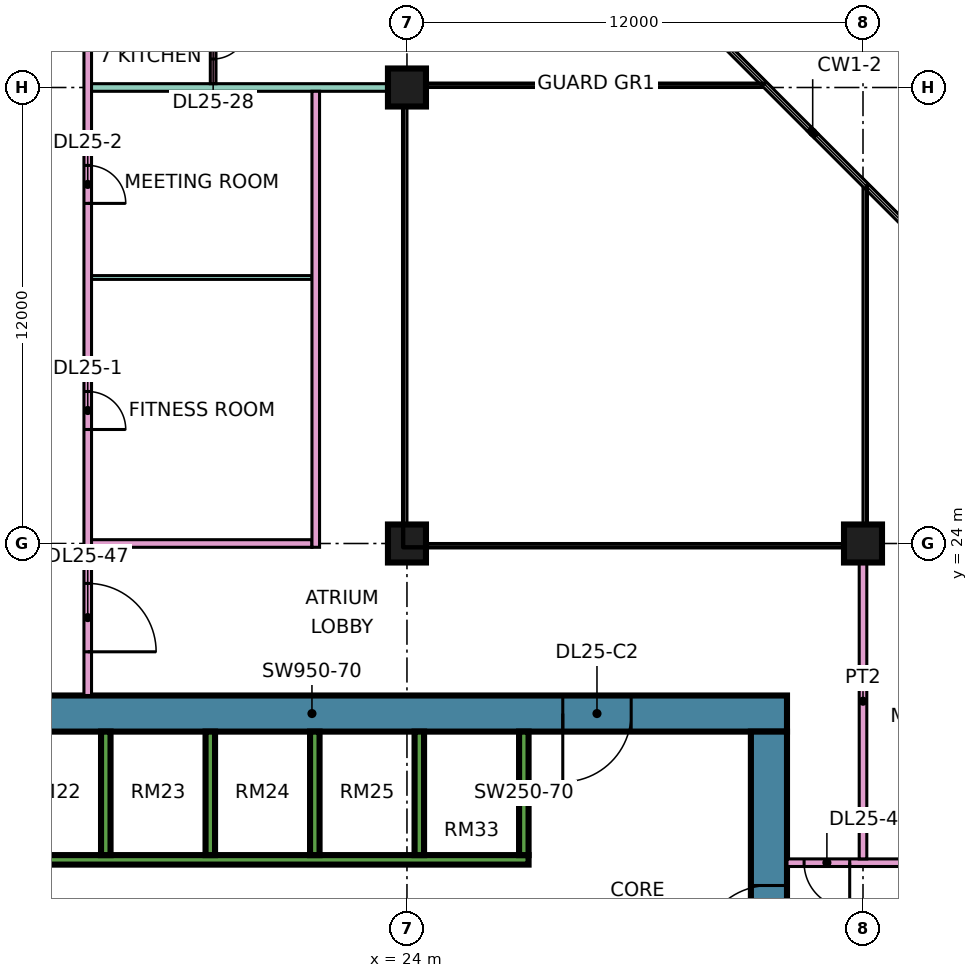
"""IFC4 building model, lengths in metres.
Left out: names, types, materials, properties, quantities, classifications, styles, units other than length and angle.
Written with IfcOpenShell. Run it as: python <this file> out.ifc"""

import sys

from ifc_helpers import new_model, si_unit, direction, frame, frame_2d, origin, origin_2d, place, context, subcontext, project, spatial, rectangle, extrude, element, fill, save


model = new_model("IFC4")
c1 = context("Model", 3, precision=1e-05, world=origin(), true_north=direction((0.0, 1.0)))
c2 = subcontext(c1, "Body", "Model", "MODEL_VIEW")
j1 = project(units=[si_unit("LENGTHUNIT", "METRE"), si_unit("PLANEANGLEUNIT", "RADIAN")], contexts=[c1])
p1 = place(None, origin())
s1 = spatial("IfcSite", under=j1, at=p1, CompositionType="ELEMENT")
p2 = place(p1, origin())
s2 = spatial("IfcBuilding", under=s1, at=p2, CompositionType="ELEMENT")
p3 = place(p2, frame((0.0, 0.0, 110.65)))
s3 = spatial("IfcBuildingStorey", under=s2, at=p3, CompositionType="ELEMENT", Elevation=110.65)
for number, where, z_axis, x_axis in (
    (1, (24.0, 24.0, 0.0), (0.0, 0.0, 1.0), (1.0, 0.0, 0.0)),
    (2, (24.0, 36.0, 0.0), (0.0, 0.0, 1.0), (1.0, 0.0, 0.0)),
    (3, (36.0, 24.0, 0.0), (0.0, 0.0, 1.0), (1.0, 0.0, 0.0)),
):
    element("IfcColumn", number, at=place(p3, frame(where, z_axis=z_axis, x_axis=x_axis)), inside=s3, PredefinedType="COLUMN", context=c2, shape_type="SweptSolid", body=[
        extrude(rectangle(XDim=1.0, YDim=1.0, at=origin_2d()), origin(), (0.0, 0.0, 1.0), 3.75),
    ])
p4 = place(p3, frame((9.0, 19.525, 0.0), z_axis=(0.0, 0.0, 1.0), x_axis=(1.0, 0.0, 0.0)))
e4 = element("IfcWall", 4, at=p4, inside=s3, PredefinedType="SHEAR", context=c2, shape_type="SweptSolid", body=[
    extrude(rectangle(XDim=25.0, YDim=0.95, at=frame_2d((12.5, 0.0))), origin(), (0.0, 0.0, 1.0), 3.75),
])
p5 = place(p4, frame((19.1, 0.0, 0.0)))
e5 = element("IfcOpeningElement", 5, at=p5, cuts=e4, PredefinedType="OPENING", context=c2, shape_type="SweptSolid", body=[
    extrude(rectangle(XDim=1.8, YDim=2.4, at=frame_2d((0.9, 1.2))), frame((0.0, 0.485, 0.0), z_axis=(0.0, -1.0, 0.0), x_axis=(1.0, 0.0, 0.0)), (0.0, 0.0, 1.0), 0.97),
])
p6 = place(p3, frame((33.525, 7.95, 0.0), z_axis=(0.0, 0.0, 1.0), x_axis=(0.0, 1.0, 0.0)))
e6 = element("IfcWall", 6, at=p6, inside=s3, PredefinedType="SHEAR", context=c2, shape_type="SweptSolid", body=[
    extrude(rectangle(XDim=11.1, YDim=0.95, at=frame_2d((5.55, 0.0))), origin(), (0.0, 0.0, 1.0), 3.75),
])
p7 = place(p6, frame((5.25, 0.0, 0.0)))
e7 = element("IfcOpeningElement", 7, at=p7, cuts=e6, PredefinedType="OPENING", context=c2, shape_type="SweptSolid", body=[
    extrude(rectangle(XDim=1.8, YDim=2.4, at=frame_2d((0.9, 1.2))), frame((0.0, 0.485, 0.0), z_axis=(0.0, -1.0, 0.0), x_axis=(1.0, 0.0, 0.0)), (0.0, 0.0, 1.0), 0.97),
])
p8 = place(p3, frame((13.45, 15.675, 0.0), z_axis=(0.0, 0.0, 1.0), x_axis=(1.0, 0.0, 0.0)))
e8 = element("IfcWall", 8, at=p8, inside=s3, PredefinedType="SHEAR", context=c2, shape_type="SweptSolid", body=[
    extrude(rectangle(XDim=13.75, YDim=0.25, at=frame_2d((6.875, 0.0))), origin(), (0.0, 0.0, 1.0), 3.75),
])
for number, where, z_axis, x_axis in (
    (9, (16.075, 15.8, 0.0), (0.0, 0.0, 1.0), (0.0, 1.0, 0.0)),
    (10, (18.825, 15.8, 0.0), (0.0, 0.0, 1.0), (0.0, 1.0, 0.0)),
    (11, (21.575, 15.8, 0.0), (0.0, 0.0, 1.0), (0.0, 1.0, 0.0)),
    (12, (24.325, 15.8, 0.0), (0.0, 0.0, 1.0), (0.0, 1.0, 0.0)),
    (13, (27.075, 15.8, 0.0), (0.0, 0.0, 1.0), (0.0, 1.0, 0.0)),
):
    element("IfcWall", number, at=place(p3, frame(where, z_axis=z_axis, x_axis=x_axis)), inside=s3, PredefinedType="SHEAR", context=c2, shape_type="SweptSolid", body=[
        extrude(rectangle(XDim=3.25, YDim=0.25, at=frame_2d((1.625, 0.0))), origin(), (0.0, 0.0, 1.0), 3.75),
    ])
p9 = place(p3, frame((15.6, 20.0, 0.0), z_axis=(0.0, 0.0, 1.0), x_axis=(0.0, 1.0, 0.0)))
e14 = element("IfcWall", 14, at=p9, inside=s3, PredefinedType="PARTITIONING", context=c2, shape_type="SweptSolid", body=[
    extrude(rectangle(XDim=27.775, YDim=0.2, at=frame_2d((13.887, 0.0))), origin(), (0.0, 0.0, 1.0), 3.35),
])
p10 = place(p9, frame((7.0, 0.0, 0.0)))
e15 = element("IfcOpeningElement", 15, at=p10, cuts=e14, PredefinedType="OPENING", context=c2, shape_type="SweptSolid", body=[
    extrude(rectangle(XDim=1.0, YDim=2.1, at=frame_2d((0.5, 1.05))), frame((0.0, 0.11, 0.0), z_axis=(0.0, -1.0, 0.0), x_axis=(1.0, 0.0, 0.0)), (0.0, 0.0, 1.0), 0.22),
])
p11 = place(p9, frame((12.95, 0.0, 0.0)))
e16 = element("IfcOpeningElement", 16, at=p11, cuts=e14, PredefinedType="OPENING", context=c2, shape_type="SweptSolid", body=[
    extrude(rectangle(XDim=1.0, YDim=2.1, at=frame_2d((0.5, 1.05))), frame((0.0, 0.11, 0.0), z_axis=(0.0, -1.0, 0.0), x_axis=(1.0, 0.0, 0.0)), (0.0, 0.0, 1.0), 0.22),
])
p12 = place(p9, frame((23.2, 0.0, 0.0)))
e17 = element("IfcOpeningElement", 17, at=p12, cuts=e14, PredefinedType="OPENING", context=c2, shape_type="SweptSolid", body=[
    extrude(rectangle(XDim=1.0, YDim=2.1, at=frame_2d((0.5, 1.05))), frame((0.0, 0.11, 0.0), z_axis=(0.0, -1.0, 0.0), x_axis=(1.0, 0.0, 0.0)), (0.0, 0.0, 1.0), 0.22),
])
p13 = place(p9, frame((1.15, 0.0, 0.0)))
e18 = element("IfcOpeningElement", 18, at=p13, cuts=e14, PredefinedType="OPENING", context=c2, shape_type="SweptSolid", body=[
    extrude(rectangle(XDim=1.8, YDim=2.1, at=frame_2d((0.9, 1.05))), frame((0.0, 0.11, 0.0), z_axis=(0.0, -1.0, 0.0), x_axis=(1.0, 0.0, 0.0)), (0.0, 0.0, 1.0), 0.22),
])
p14 = place(p9, frame((25.9, 0.0, 0.0)))
e19 = element("IfcOpeningElement", 19, at=p14, cuts=e14, PredefinedType="OPENING", context=c2, shape_type="SweptSolid", body=[
    extrude(rectangle(XDim=1.0, YDim=2.1, at=frame_2d((0.5, 1.05))), frame((0.0, 0.11, 0.0), z_axis=(0.0, -1.0, 0.0), x_axis=(1.0, 0.0, 0.0)), (0.0, 0.0, 1.0), 0.22),
])
p15 = place(p3, frame((15.7, 24.0, 0.0), z_axis=(0.0, 0.0, 1.0), x_axis=(1.0, 0.0, 0.0)))
e20 = element("IfcWall", 20, at=p15, inside=s3, PredefinedType="PARTITIONING", context=c2, shape_type="SweptSolid", body=[
    extrude(rectangle(XDim=5.8, YDim=0.2, at=frame_2d((2.9, 0.0))), origin(), (0.0, 0.0, 1.0), 3.35),
])
p16 = place(p3, frame((15.7, 31.0, 0.0), z_axis=(0.0, 0.0, 1.0), x_axis=(1.0, 0.0, 0.0)))
e21 = element("IfcWall", 21, at=p16, inside=s3, PredefinedType="PARTITIONING", context=c2, shape_type="SweptSolid", body=[
    extrude(rectangle(XDim=5.8, YDim=0.1, at=frame_2d((2.9, 0.0))), origin(), (0.0, 0.0, 1.0), 3.35),
])
p17 = place(p3, frame((15.7, 36.0, 0.0), z_axis=(0.0, 0.0, 1.0), x_axis=(1.0, 0.0, 0.0)))
e22 = element("IfcWall", 22, at=p17, inside=s3, PredefinedType="PARTITIONING", context=c2, shape_type="SweptSolid", body=[
    extrude(rectangle(XDim=8.3, YDim=0.2, at=frame_2d((4.15, 0.0))), origin(), (0.0, 0.0, 1.0), 3.35),
])
p18 = place(p3, frame((18.9, 36.1, 0.0), z_axis=(0.0, 0.0, 1.0), x_axis=(0.0, 1.0, 0.0)))
e23 = element("IfcWall", 23, at=p18, inside=s3, PredefinedType="PARTITIONING", context=c2, shape_type="SweptSolid", body=[
    extrude(rectangle(XDim=6.275, YDim=0.15, at=frame_2d((3.137, 0.0))), origin(), (0.0, 0.0, 1.0), 3.35),
])
p19 = place(p18, frame((0.65, 0.0, 0.0)))
e24 = element("IfcOpeningElement", 24, at=p19, cuts=e23, PredefinedType="OPENING", context=c2, shape_type="SweptSolid", body=[
    extrude(rectangle(XDim=0.9, YDim=2.1, at=frame_2d((0.45, 1.05))), frame((0.0, 0.085, 0.0), z_axis=(0.0, -1.0, 0.0), x_axis=(1.0, 0.0, 0.0)), (0.0, 0.0, 1.0), 0.17),
])
p20 = place(p3, frame((21.6, 23.9, 0.0), z_axis=(0.0, 0.0, 1.0), x_axis=(0.0, 1.0, 0.0)))
e25 = element("IfcWall", 25, at=p20, inside=s3, PredefinedType="PARTITIONING", context=c2, shape_type="SweptSolid", body=[
    extrude(rectangle(XDim=12.0, YDim=0.2, at=frame_2d((6.0, 0.0))), origin(), (0.0, 0.0, 1.0), 3.35),
])
p21 = place(p3, frame((34.0, 15.6, 0.0), z_axis=(0.0, 0.0, 1.0), x_axis=(1.0, 0.0, 0.0)))
e26 = element("IfcWall", 26, at=p21, inside=s3, PredefinedType="PARTITIONING", context=c2, shape_type="SweptSolid", body=[
    extrude(rectangle(XDim=10.35, YDim=0.2, at=frame_2d((5.175, 0.0))), origin(), (0.0, 0.0, 1.0), 3.35),
])
p22 = place(p21, frame((5.6, 0.0, 0.0)))
e27 = element("IfcOpeningElement", 27, at=p22, cuts=e26, PredefinedType="OPENING", context=c2, shape_type="SweptSolid", body=[
    extrude(rectangle(XDim=1.0, YDim=2.1, at=frame_2d((0.5, 1.05))), frame((0.0, 0.11, 0.0), z_axis=(0.0, -1.0, 0.0), x_axis=(1.0, 0.0, 0.0)), (0.0, 0.0, 1.0), 0.22),
])
p23 = place(p21, frame((0.45, 0.0, 0.0)))
e28 = element("IfcOpeningElement", 28, at=p23, cuts=e26, PredefinedType="OPENING", context=c2, shape_type="SweptSolid", body=[
    extrude(rectangle(XDim=1.2, YDim=2.1, at=frame_2d((0.6, 1.05))), frame((0.0, 0.11, 0.0), z_axis=(0.0, -1.0, 0.0), x_axis=(1.0, 0.0, 0.0)), (0.0, 0.0, 1.0), 0.22),
])
p24 = place(p3, frame((36.0, 15.7, 0.0), z_axis=(0.0, 0.0, 1.0), x_axis=(0.0, 1.0, 0.0)))
e29 = element("IfcWall", 29, at=p24, inside=s3, PredefinedType="PARTITIONING", context=c2, shape_type="SweptSolid", body=[
    extrude(rectangle(XDim=8.3, YDim=0.2, at=frame_2d((4.15, 0.0))), origin(), (0.0, 0.0, 1.0), 3.35),
])
p25 = place(p7, origin())
e30 = element("IfcDoor", 30, at=p25, inside=s3, OperationType="DOUBLE_DOOR_SINGLE_SWING", PredefinedType="DOOR", context=c2, shape_type="SweptSolid", body=[
    extrude(rectangle(XDim=1.8, YDim=2.4, at=frame_2d((0.9, 1.2))), frame((0.0, 0.025, 0.0), z_axis=(0.0, -1.0, 0.0), x_axis=(1.0, 0.0, 0.0)), (0.0, 0.0, 1.0), 0.05),
])
fill(e7, e30)
p26 = place(p5, frame((1.8, 0.0, 0.0), z_axis=(0.0, 0.0, 1.0), x_axis=(-1.0, 0.0, 0.0)))
e31 = element("IfcDoor", 31, at=p26, inside=s3, OperationType="DOUBLE_DOOR_SINGLE_SWING", PredefinedType="DOOR", context=c2, shape_type="SweptSolid", body=[
    extrude(rectangle(XDim=1.8, YDim=2.4, at=frame_2d((0.9, 1.2))), frame((0.0, 0.025, 0.0), z_axis=(0.0, -1.0, 0.0), x_axis=(1.0, 0.0, 0.0)), (0.0, 0.0, 1.0), 0.05),
])
fill(e5, e31)
p27 = place(p10, frame((1.0, 0.0, 0.0), z_axis=(0.0, 0.0, 1.0), x_axis=(-1.0, 0.0, 0.0)))
e32 = element("IfcDoor", 32, at=p27, inside=s3, OperationType="SINGLE_SWING_LEFT", PredefinedType="DOOR", context=c2, shape_type="SweptSolid", body=[
    extrude(rectangle(XDim=1.0, YDim=2.1, at=frame_2d((0.5, 1.05))), frame((0.0, 0.025, 0.0), z_axis=(0.0, -1.0, 0.0), x_axis=(1.0, 0.0, 0.0)), (0.0, 0.0, 1.0), 0.05),
])
fill(e15, e32)
p28 = place(p11, frame((1.0, 0.0, 0.0), z_axis=(0.0, 0.0, 1.0), x_axis=(-1.0, 0.0, 0.0)))
e33 = element("IfcDoor", 33, at=p28, inside=s3, OperationType="SINGLE_SWING_LEFT", PredefinedType="DOOR", context=c2, shape_type="SweptSolid", body=[
    extrude(rectangle(XDim=1.0, YDim=2.1, at=frame_2d((0.5, 1.05))), frame((0.0, 0.025, 0.0), z_axis=(0.0, -1.0, 0.0), x_axis=(1.0, 0.0, 0.0)), (0.0, 0.0, 1.0), 0.05),
])
fill(e16, e33)
p29 = place(p19, origin())
e34 = element("IfcDoor", 34, at=p29, inside=s3, OperationType="SINGLE_SWING_RIGHT", PredefinedType="DOOR", context=c2, shape_type="SweptSolid", body=[
    extrude(rectangle(XDim=0.9, YDim=2.1, at=frame_2d((0.45, 1.05))), frame((0.0, 0.025, 0.0), z_axis=(0.0, -1.0, 0.0), x_axis=(1.0, 0.0, 0.0)), (0.0, 0.0, 1.0), 0.05),
])
fill(e24, e34)
p30 = place(p23, origin())
e35 = element("IfcDoor", 35, at=p30, inside=s3, OperationType="SINGLE_SWING_RIGHT", PredefinedType="DOOR", context=c2, shape_type="SweptSolid", body=[
    extrude(rectangle(XDim=1.2, YDim=2.1, at=frame_2d((0.6, 1.05))), frame((0.0, 0.025, 0.0), z_axis=(0.0, -1.0, 0.0), x_axis=(1.0, 0.0, 0.0)), (0.0, 0.0, 1.0), 0.05),
])
fill(e28, e35)
p31 = place(p13, frame((1.8, 0.0, 0.0), z_axis=(0.0, 0.0, 1.0), x_axis=(-1.0, 0.0, 0.0)))
e36 = element("IfcDoor", 36, at=p31, inside=s3, OperationType="DOUBLE_DOOR_SINGLE_SWING", PredefinedType="DOOR", context=c2, shape_type="SweptSolid", body=[
    extrude(rectangle(XDim=1.8, YDim=2.1, at=frame_2d((0.9, 1.05))), frame((0.0, 0.025, 0.0), z_axis=(0.0, -1.0, 0.0), x_axis=(1.0, 0.0, 0.0)), (0.0, 0.0, 1.0), 0.05),
])
fill(e18, e36)
save(model, sys.argv[1])
